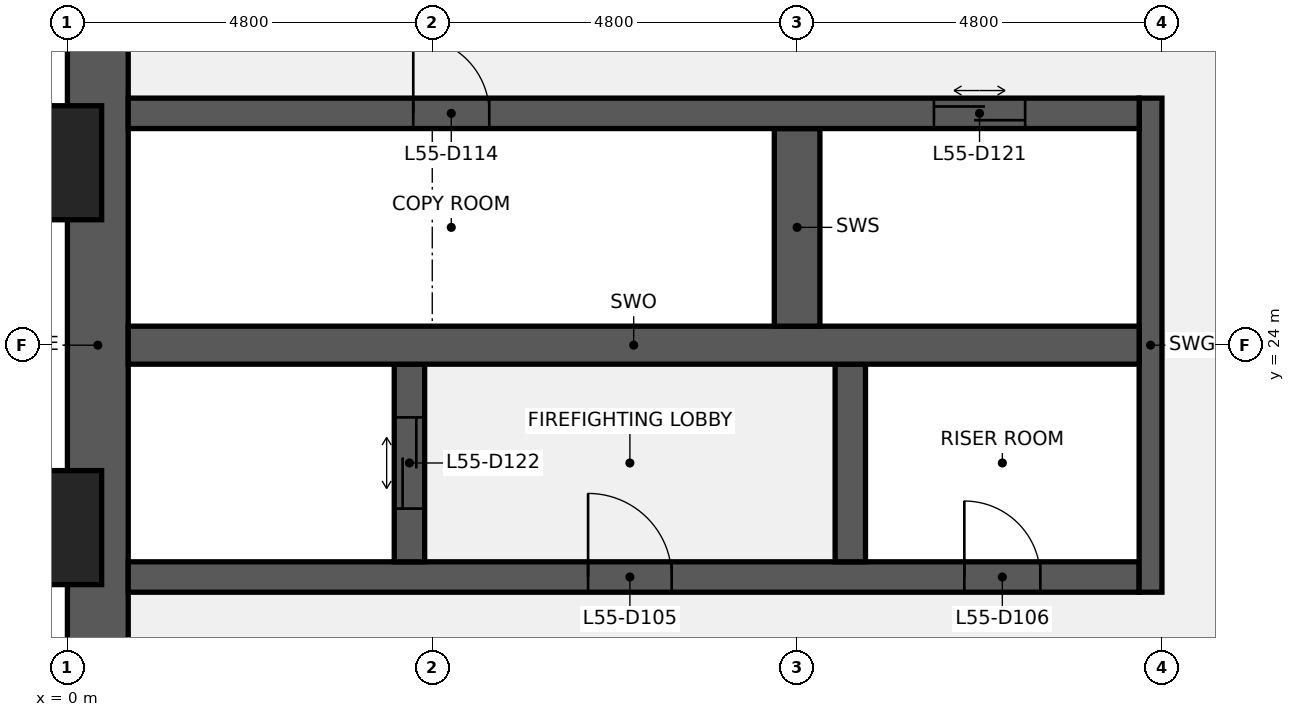
"""IFC4 building model, lengths in metres.
Left out: names, types, materials, properties, quantities, classifications, styles, units other than length and angle.
Written with IfcOpenShell. Run it as: python <this file> out.ifc"""

import sys

from ifc_helpers import new_model, si_unit, direction, frame, frame_2d, origin, origin_2d, place, context, subcontext, project, spatial, rectangle, extrude, element, fill, save


model = new_model("IFC4")
c1 = context("Model", 3, precision=1e-05, world=origin(), true_north=direction((0.0, 1.0)))
c2 = subcontext(c1, "Body", "Model", "MODEL_VIEW")
j1 = project(units=[si_unit("LENGTHUNIT", "METRE"), si_unit("PLANEANGLEUNIT", "RADIAN")], contexts=[c1])
p1 = place(None, origin())
s1 = spatial("IfcSite", under=j1, at=p1, CompositionType="ELEMENT")
p2 = place(p1, origin())
s2 = spatial("IfcBuilding", under=s1, at=p2, CompositionType="ELEMENT")
p3 = place(p2, frame((0.0, 0.0, 249.2)))
s3 = spatial("IfcBuildingStorey", under=s2, at=p3, CompositionType="ELEMENT", Elevation=249.2)
p4 = place(p3, frame((0.4, 9.6, 0.0), z_axis=(0.0, 0.0, 1.0), x_axis=(0.0, 1.0, 0.0)))
e1 = element("IfcWall", 1, at=p4, inside=s3, PredefinedType="SHEAR", context=c2, shape_type="SweptSolid", body=[
    extrude(rectangle(XDim=28.8, YDim=0.8, at=frame_2d((14.4, 0.0))), origin(), (0.0, 0.0, 1.0), 3.84),
])
p5 = place(p4, frame((8.85, 0.0, 0.9)))
e2 = element("IfcOpeningElement", 2, at=p5, cuts=e1, PredefinedType="OPENING", context=c2, shape_type="SweptSolid", body=[
    extrude(rectangle(XDim=1.5, YDim=1.5, at=frame_2d((0.75, 0.75))), frame((0.0, 0.41, 0.0), z_axis=(0.0, -1.0, 0.0), x_axis=(1.0, 0.0, 0.0)), (0.0, 0.0, 1.0), 0.82),
])
p6 = place(p4, frame((18.45, 0.0, 0.9)))
e3 = element("IfcOpeningElement", 3, at=p6, cuts=e1, PredefinedType="OPENING", context=c2, shape_type="SweptSolid", body=[
    extrude(rectangle(XDim=1.5, YDim=1.5, at=frame_2d((0.75, 0.75))), frame((0.0, 0.41, 0.0), z_axis=(0.0, -1.0, 0.0), x_axis=(1.0, 0.0, 0.0)), (0.0, 0.0, 1.0), 0.82),
])
p7 = place(p3, frame((0.8, 20.95, 0.0), z_axis=(0.0, 0.0, 1.0), x_axis=(1.0, 0.0, 0.0)))
e4 = element("IfcWall", 4, at=p7, inside=s3, PredefinedType="SHEAR", context=c2, shape_type="SweptSolid", body=[
    extrude(rectangle(XDim=13.3, YDim=0.4, at=frame_2d((6.65, 0.0))), origin(), (0.0, 0.0, 1.0), 3.84),
])
p8 = place(p7, frame((6.05, 0.0, 0.0)))
e5 = element("IfcOpeningElement", 5, at=p8, cuts=e4, PredefinedType="OPENING", context=c2, shape_type="SweptSolid", body=[
    extrude(rectangle(XDim=1.1, YDim=2.1, at=frame_2d((0.55, 1.05))), frame((0.0, 0.21, 0.0), z_axis=(0.0, -1.0, 0.0), x_axis=(1.0, 0.0, 0.0)), (0.0, 0.0, 1.0), 0.42),
])
p9 = place(p7, frame((11.0, 0.0, 0.0)))
e6 = element("IfcOpeningElement", 6, at=p9, cuts=e4, PredefinedType="OPENING", context=c2, shape_type="SweptSolid", body=[
    extrude(rectangle(XDim=1.0, YDim=2.1, at=frame_2d((0.5, 1.05))), frame((0.0, 0.21, 0.0), z_axis=(0.0, -1.0, 0.0), x_axis=(1.0, 0.0, 0.0)), (0.0, 0.0, 1.0), 0.42),
])
p10 = place(p3, frame((14.25, 20.75, 0.0), z_axis=(0.0, 0.0, 1.0), x_axis=(0.0, 1.0, 0.0)))
e7 = element("IfcWall", 7, at=p10, inside=s3, PredefinedType="SHEAR", context=c2, shape_type="SweptSolid", body=[
    extrude(rectangle(XDim=6.5, YDim=0.3, at=frame_2d((3.25, 0.0))), origin(), (0.0, 0.0, 1.0), 3.84),
])
p11 = place(p3, frame((4.5, 21.15, 0.0), z_axis=(0.0, 0.0, 1.0), x_axis=(0.0, 1.0, 0.0)))
e8 = element("IfcWall", 8, at=p11, inside=s3, PredefinedType="SHEAR", context=c2, shape_type="SweptSolid", body=[
    extrude(rectangle(XDim=2.6, YDim=0.4, at=frame_2d((1.3, 0.0))), origin(), (0.0, 0.0, 1.0), 3.84),
])
p12 = place(p11, frame((0.7, 0.0, 0.0)))
e9 = element("IfcOpeningElement", 9, at=p12, cuts=e8, PredefinedType="OPENING", context=c2, shape_type="SweptSolid", body=[
    extrude(rectangle(XDim=1.2, YDim=2.1, at=frame_2d((0.6, 1.05))), frame((0.0, 0.21, 0.0), z_axis=(0.0, -1.0, 0.0), x_axis=(1.0, 0.0, 0.0)), (0.0, 0.0, 1.0), 0.42),
])
p13 = place(p3, frame((10.3, 21.15, 0.0), z_axis=(0.0, 0.0, 1.0), x_axis=(0.0, 1.0, 0.0)))
e10 = element("IfcWall", 10, at=p13, inside=s3, PredefinedType="SHEAR", context=c2, shape_type="SweptSolid", body=[
    extrude(rectangle(XDim=2.6, YDim=0.4, at=frame_2d((1.3, 0.0))), origin(), (0.0, 0.0, 1.0), 3.84),
])
p14 = place(p3, frame((0.8, 24.0, 0.0), z_axis=(0.0, 0.0, 1.0), x_axis=(1.0, 0.0, 0.0)))
e11 = element("IfcWall", 11, at=p14, inside=s3, PredefinedType="SHEAR", context=c2, shape_type="SweptSolid", body=[
    extrude(rectangle(XDim=13.3, YDim=0.5, at=frame_2d((6.65, 0.0))), origin(), (0.0, 0.0, 1.0), 3.84),
])
p15 = place(p3, frame((9.6, 24.25, 0.0), z_axis=(0.0, 0.0, 1.0), x_axis=(0.0, 1.0, 0.0)))
e12 = element("IfcWall", 12, at=p15, inside=s3, PredefinedType="SHEAR", context=c2, shape_type="SweptSolid", body=[
    extrude(rectangle(XDim=2.6, YDim=0.6, at=frame_2d((1.3, 0.0))), origin(), (0.0, 0.0, 1.0), 3.84),
])
p16 = place(p3, frame((0.8, 27.05, 0.0), z_axis=(0.0, 0.0, 1.0), x_axis=(1.0, 0.0, 0.0)))
e13 = element("IfcWall", 13, at=p16, inside=s3, PredefinedType="SHEAR", context=c2, shape_type="SweptSolid", body=[
    extrude(rectangle(XDim=13.3, YDim=0.4, at=frame_2d((6.65, 0.0))), origin(), (0.0, 0.0, 1.0), 3.84),
])
p17 = place(p16, frame((3.75, 0.0, 0.0)))
e14 = element("IfcOpeningElement", 14, at=p17, cuts=e13, PredefinedType="OPENING", context=c2, shape_type="SweptSolid", body=[
    extrude(rectangle(XDim=1.0, YDim=2.1, at=frame_2d((0.5, 1.05))), frame((0.0, 0.21, 0.0), z_axis=(0.0, -1.0, 0.0), x_axis=(1.0, 0.0, 0.0)), (0.0, 0.0, 1.0), 0.42),
])
p18 = place(p16, frame((10.6, 0.0, 0.0)))
e15 = element("IfcOpeningElement", 15, at=p18, cuts=e13, PredefinedType="OPENING", context=c2, shape_type="SweptSolid", body=[
    extrude(rectangle(XDim=1.2, YDim=2.1, at=frame_2d((0.6, 1.05))), frame((0.0, 0.21, 0.0), z_axis=(0.0, -1.0, 0.0), x_axis=(1.0, 0.0, 0.0)), (0.0, 0.0, 1.0), 0.42),
])
for number, where, z_axis, x_axis in (
    (16, (-0.75, 21.6, 0.0), (0.0, 0.0, 1.0), (0.0, 1.0, 0.0)),
    (17, (-0.75, 26.4, 0.0), (0.0, 0.0, 1.0), (0.0, 1.0, 0.0)),
):
    element("IfcColumn", number, at=place(p3, frame(where, z_axis=z_axis, x_axis=x_axis)), inside=s3, PredefinedType="PILASTER", context=c2, shape_type="SweptSolid", body=[
        extrude(rectangle(XDim=2.4, YDim=1.5, at=origin_2d()), origin(), (0.0, 0.0, 1.0), 4.0),
    ])
p19 = place(p8, origin())
e18 = element("IfcDoor", 18, at=p19, inside=s3, OperationType="SINGLE_SWING_LEFT", PredefinedType="DOOR", context=c2, shape_type="SweptSolid", body=[
    extrude(rectangle(XDim=1.1, YDim=2.1, at=frame_2d((0.55, 1.05))), frame((0.0, 0.025, 0.0), z_axis=(0.0, -1.0, 0.0), x_axis=(1.0, 0.0, 0.0)), (0.0, 0.0, 1.0), 0.05),
])
fill(e5, e18)
p20 = place(p9, origin())
e19 = element("IfcDoor", 19, at=p20, inside=s3, OperationType="SINGLE_SWING_LEFT", PredefinedType="DOOR", context=c2, shape_type="SweptSolid", body=[
    extrude(rectangle(XDim=1.0, YDim=2.1, at=frame_2d((0.5, 1.05))), frame((0.0, 0.025, 0.0), z_axis=(0.0, -1.0, 0.0), x_axis=(1.0, 0.0, 0.0)), (0.0, 0.0, 1.0), 0.05),
])
fill(e6, e19)
p21 = place(p17, origin())
e20 = element("IfcDoor", 20, at=p21, inside=s3, OperationType="SINGLE_SWING_LEFT", PredefinedType="DOOR", context=c2, shape_type="SweptSolid", body=[
    extrude(rectangle(XDim=1.0, YDim=2.1, at=frame_2d((0.5, 1.05))), frame((0.0, 0.025, 0.0), z_axis=(0.0, -1.0, 0.0), x_axis=(1.0, 0.0, 0.0)), (0.0, 0.0, 1.0), 0.05),
])
fill(e14, e20)
p22 = place(p18, origin())
e21 = element("IfcDoor", 21, at=p22, inside=s3, OperationType="DOUBLE_DOOR_SLIDING", PredefinedType="DOOR", context=c2, shape_type="SweptSolid", body=[
    extrude(rectangle(XDim=1.2, YDim=2.1, at=frame_2d((0.6, 1.05))), frame((0.0, 0.025, 0.0), z_axis=(0.0, -1.0, 0.0), x_axis=(1.0, 0.0, 0.0)), (0.0, 0.0, 1.0), 0.05),
])
fill(e15, e21)
p23 = place(p12, origin())
e22 = element("IfcDoor", 22, at=p23, inside=s3, OperationType="DOUBLE_DOOR_SLIDING", PredefinedType="DOOR", context=c2, shape_type="SweptSolid", body=[
    extrude(rectangle(XDim=1.2, YDim=2.1, at=frame_2d((0.6, 1.05))), frame((0.0, 0.025, 0.0), z_axis=(0.0, -1.0, 0.0), x_axis=(1.0, 0.0, 0.0)), (0.0, 0.0, 1.0), 0.05),
])
fill(e9, e22)
save(model, sys.argv[1])
